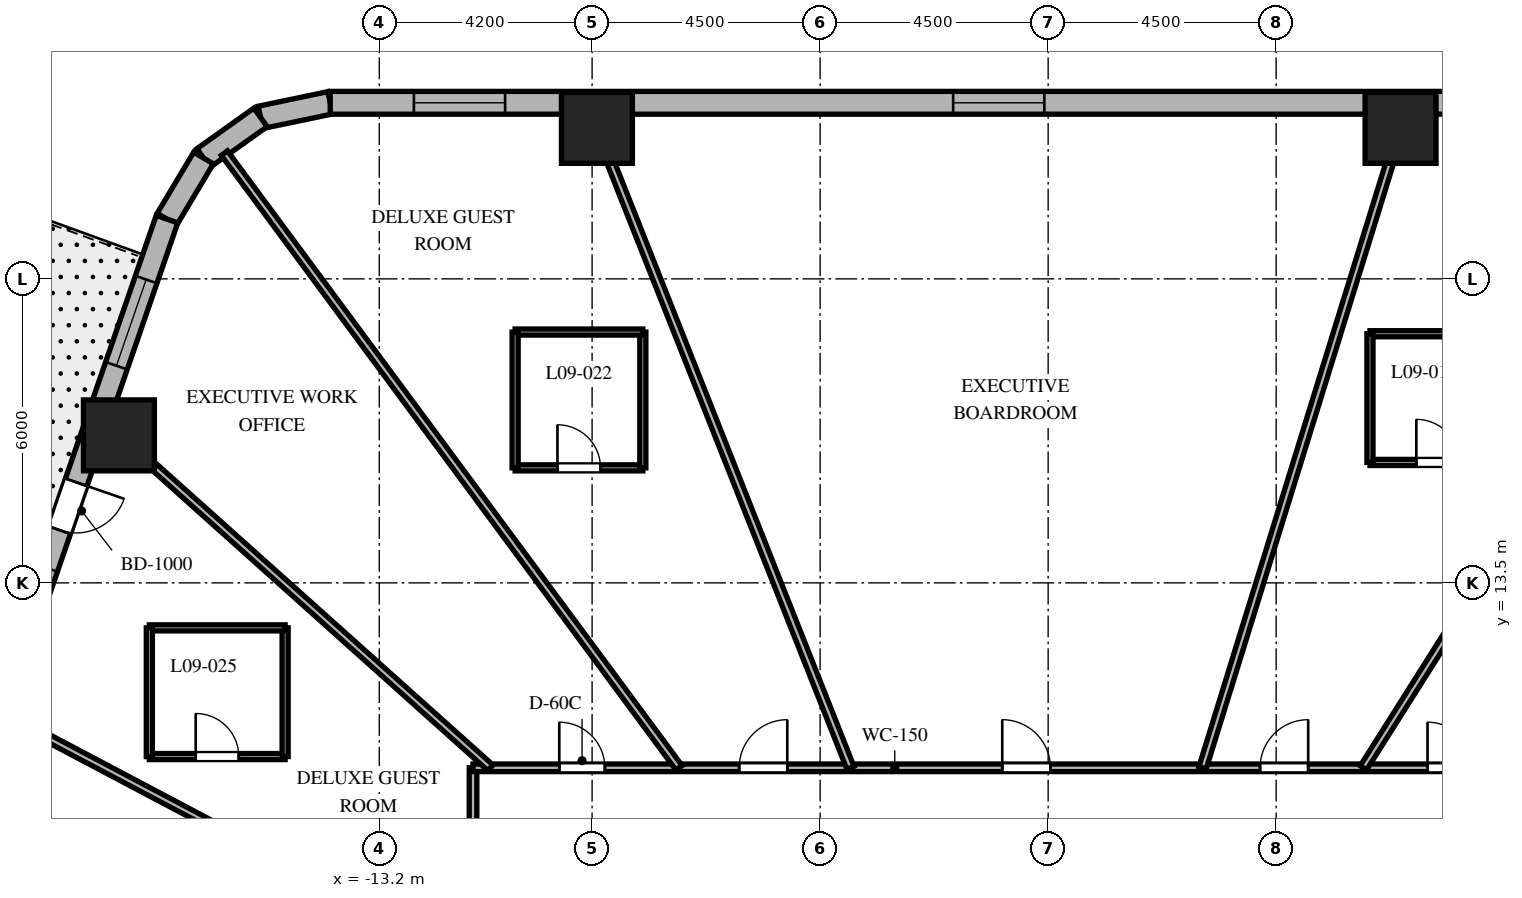
"""IFC4 building model, lengths in metres.
Left out: names, types, materials, properties, quantities, classifications, styles, units other than length and angle.
Written with IfcOpenShell. Run it as: python <this file> out.ifc"""

import sys

from ifc_helpers import new_model, si_unit, direction, frame, frame_2d, origin, origin_2d, place, context, subcontext, project, spatial, rectangle, extrude, element, fill, save


model = new_model("IFC4")
c1 = context("Model", 3, precision=1e-05, world=origin(), true_north=direction((0.0, 1.0)))
c2 = subcontext(c1, "Body", "Model", "MODEL_VIEW")
j1 = project(units=[si_unit("LENGTHUNIT", "METRE"), si_unit("PLANEANGLEUNIT", "RADIAN")], contexts=[c1])
p1 = place(None, origin())
s1 = spatial("IfcSite", under=j1, at=p1, CompositionType="ELEMENT")
p2 = place(p1, origin())
s2 = spatial("IfcBuilding", under=s1, at=p2, CompositionType="ELEMENT")
p3 = place(p2, frame((0.0, 0.0, 45.3)))
s3 = spatial("IfcBuildingStorey", under=s2, at=p3, CompositionType="ELEMENT", Elevation=45.3)
for number, where, z_axis, x_axis in (
    (1, (6.955, 22.48, 0.0), (0.0, 0.0, 1.0), (1.0, 0.0, 0.0)),
    (2, (-8.905, 22.48, 0.0), (0.0, 0.0, 1.0), (1.0, 0.0, 0.0)),
    (3, (-18.338, 16.411, 0.0), (0.0, 0.0, 1.0), (1.0, 0.0, 0.0)),
):
    element("IfcColumn", number, at=place(p3, frame(where, z_axis=z_axis, x_axis=x_axis)), inside=s3, PredefinedType="COLUMN", context=c2, shape_type="SweptSolid", body=[
        extrude(rectangle(XDim=1.4, YDim=1.4, at=origin_2d()), origin(), (0.0, 0.0, 1.0), 3.7),
    ])
p4 = place(p3, frame((-14.168, 22.975, 0.0), z_axis=(0.0, 0.0, 1.0), x_axis=(-0.978770371074, -0.204959900243, 0.0)))
e4 = element("IfcWall", 4, at=p4, inside=s3, PredefinedType="SOLIDWALL", context=c2, shape_type="SweptSolid", body=[
    extrude(rectangle(XDim=1.406, YDim=0.45, at=frame_2d((0.703, 0.0))), origin(), (0.0, 0.0, 1.0), 3.4),
])
p5 = place(p3, frame((-15.544, 22.687, 0.0), z_axis=(0.0, 0.0, 1.0), x_axis=(-0.814210854316, -0.580569276412, 0.0)))
e5 = element("IfcWall", 5, at=p5, inside=s3, PredefinedType="SOLIDWALL", context=c2, shape_type="SweptSolid", body=[
    extrude(rectangle(XDim=1.381, YDim=0.45, at=frame_2d((0.691, 0.0))), origin(), (0.0, 0.0, 1.0), 3.4),
])
p6 = place(p3, frame((-16.669, 21.885, 0.0), z_axis=(0.0, 0.0, 1.0), x_axis=(-0.512936712947, -0.858426425799, 0.0)))
e6 = element("IfcWall", 6, at=p6, inside=s3, PredefinedType="SOLIDWALL", context=c2, shape_type="SweptSolid", body=[
    extrude(rectangle(XDim=1.406, YDim=0.45, at=frame_2d((0.703, 0.0))), origin(), (0.0, 0.0, 1.0), 3.4),
])
p7 = place(p3, frame((12.221, 22.975, 0.0), z_axis=(0.0, 0.0, 1.0), x_axis=(-1.0, 0.0, 0.0)))
e7 = element("IfcWall", 7, at=p7, inside=s3, PredefinedType="SOLIDWALL", context=c2, shape_type="SweptSolid", body=[
    extrude(rectangle(XDim=26.389, YDim=0.45, at=frame_2d((13.195, 0.0))), origin(), (0.0, 0.0, 1.0), 3.4),
])
p8 = place(p7, frame((1.653, 0.0, 0.8)))
e8 = element("IfcOpeningElement", 8, at=p8, cuts=e7, PredefinedType="OPENING", context=c2, shape_type="SweptSolid", body=[
    extrude(rectangle(XDim=1.8, YDim=1.8, at=frame_2d((0.9, 0.9))), frame((0.0, 0.235, 0.0), z_axis=(0.0, -1.0, 0.0), x_axis=(1.0, 0.0, 0.0)), (0.0, 0.0, 1.0), 0.47),
])
p9 = place(p7, frame((12.296, 0.0, 0.8)))
e9 = element("IfcOpeningElement", 9, at=p9, cuts=e7, PredefinedType="OPENING", context=c2, shape_type="SweptSolid", body=[
    extrude(rectangle(XDim=1.8, YDim=1.8, at=frame_2d((0.9, 0.9))), frame((0.0, 0.235, 0.0), z_axis=(0.0, -1.0, 0.0), x_axis=(1.0, 0.0, 0.0)), (0.0, 0.0, 1.0), 0.47),
])
p10 = place(p7, frame((22.938, 0.0, 0.8)))
e10 = element("IfcOpeningElement", 10, at=p10, cuts=e7, PredefinedType="OPENING", context=c2, shape_type="SweptSolid", body=[
    extrude(rectangle(XDim=1.8, YDim=1.8, at=frame_2d((0.9, 0.9))), frame((0.0, 0.235, 0.0), z_axis=(0.0, -1.0, 0.0), x_axis=(1.0, 0.0, 0.0)), (0.0, 0.0, 1.0), 0.47),
])
p11 = place(p3, frame((-17.39, 20.678, 0.0), z_axis=(0.0, 0.0, 1.0), x_axis=(-0.326068018294, -0.945346310854, 0.0)))
e11 = element("IfcWall", 11, at=p11, inside=s3, PredefinedType="SOLIDWALL", context=c2, shape_type="SweptSolid", body=[
    extrude(rectangle(XDim=21.793, YDim=0.45, at=frame_2d((10.896, 0.0))), origin(), (0.0, 0.0, 1.0), 3.4),
])
p12 = place(p11, frame((5.493, 0.0, 0.0)))
e12 = element("IfcOpeningElement", 12, at=p12, cuts=e11, PredefinedType="OPENING", context=c2, shape_type="SweptSolid", body=[
    extrude(rectangle(XDim=1.0, YDim=2.15, at=frame_2d((0.5, 1.075))), frame((0.0, 0.235, 0.0), z_axis=(0.0, -1.0, 0.0), x_axis=(1.0, 0.0, 0.0)), (0.0, 0.0, 1.0), 0.47),
])
p13 = place(p11, frame((1.26, 0.0, 0.8)))
e13 = element("IfcOpeningElement", 13, at=p13, cuts=e11, PredefinedType="OPENING", context=c2, shape_type="SweptSolid", body=[
    extrude(rectangle(XDim=1.8, YDim=1.8, at=frame_2d((0.9, 0.9))), frame((0.0, 0.235, 0.0), z_axis=(0.0, -1.0, 0.0), x_axis=(1.0, 0.0, 0.0)), (0.0, 0.0, 1.0), 0.47),
])
p14 = place(p11, frame((7.283, 0.0, 0.8)))
e14 = element("IfcOpeningElement", 14, at=p14, cuts=e11, PredefinedType="OPENING", context=c2, shape_type="SweptSolid", body=[
    extrude(rectangle(XDim=1.8, YDim=1.8, at=frame_2d((0.9, 0.9))), frame((0.0, 0.235, 0.0), z_axis=(0.0, -1.0, 0.0), x_axis=(1.0, 0.0, 0.0)), (0.0, 0.0, 1.0), 0.47),
])
p15 = place(p11, frame((12.736, 0.0, 0.8)))
e15 = element("IfcOpeningElement", 15, at=p15, cuts=e11, PredefinedType="OPENING", context=c2, shape_type="SweptSolid", body=[
    extrude(rectangle(XDim=1.8, YDim=1.8, at=frame_2d((0.9, 0.9))), frame((0.0, 0.235, 0.0), z_axis=(0.0, -1.0, 0.0), x_axis=(1.0, 0.0, 0.0)), (0.0, 0.0, 1.0), 0.47),
])
p16 = place(p11, frame((18.68, 0.0, 0.8)))
e16 = element("IfcOpeningElement", 16, at=p16, cuts=e11, PredefinedType="OPENING", context=c2, shape_type="SweptSolid", body=[
    extrude(rectangle(XDim=1.8, YDim=1.8, at=frame_2d((0.9, 0.9))), frame((0.0, 0.235, 0.0), z_axis=(0.0, -1.0, 0.0), x_axis=(1.0, 0.0, 0.0)), (0.0, 0.0, 1.0), 0.47),
])
p17 = place(p3, frame((-11.35, -9.85, 0.0), z_axis=(0.0, 0.0, 1.0), x_axis=(0.0, 1.0, 0.0)))
e17 = element("IfcWall", 17, at=p17, inside=s3, PredefinedType="PARTITIONING", context=c2, shape_type="SweptSolid", body=[
    extrude(rectangle(XDim=19.7, YDim=0.15, at=frame_2d((9.85, 0.0))), origin(), (0.0, 0.0, 1.0), 2.84),
])
p18 = place(p17, frame((17.181, 0.0, 0.0)))
e18 = element("IfcOpeningElement", 18, at=p18, cuts=e17, PredefinedType="OPENING", context=c2, shape_type="SweptSolid", body=[
    extrude(rectangle(XDim=0.95, YDim=2.03, at=frame_2d((0.475, 1.015))), frame((0.0, 0.085, 0.0), z_axis=(0.0, -1.0, 0.0), x_axis=(1.0, 0.0, 0.0)), (0.0, 0.0, 1.0), 0.17),
])
p19 = place(p17, frame((13.403, 0.0, 0.0)))
e19 = element("IfcOpeningElement", 19, at=p19, cuts=e17, PredefinedType="OPENING", context=c2, shape_type="SweptSolid", body=[
    extrude(rectangle(XDim=0.95, YDim=2.03, at=frame_2d((0.475, 1.015))), frame((0.0, 0.085, 0.0), z_axis=(0.0, -1.0, 0.0), x_axis=(1.0, 0.0, 0.0)), (0.0, 0.0, 1.0), 0.17),
])
p20 = place(p17, frame((10.134, 0.0, 0.0)))
e20 = element("IfcOpeningElement", 20, at=p20, cuts=e17, PredefinedType="OPENING", context=c2, shape_type="SweptSolid", body=[
    extrude(rectangle(XDim=0.95, YDim=2.03, at=frame_2d((0.475, 1.015))), frame((0.0, 0.085, 0.0), z_axis=(0.0, -1.0, 0.0), x_axis=(1.0, 0.0, 0.0)), (0.0, 0.0, 1.0), 0.17),
])
p21 = place(p17, frame((7.571, 0.0, 0.0)))
e21 = element("IfcOpeningElement", 21, at=p21, cuts=e17, PredefinedType="OPENING", context=c2, shape_type="SweptSolid", body=[
    extrude(rectangle(XDim=0.95, YDim=2.03, at=frame_2d((0.475, 1.015))), frame((0.0, 0.085, 0.0), z_axis=(0.0, -1.0, 0.0), x_axis=(1.0, 0.0, 0.0)), (0.0, 0.0, 1.0), 0.17),
])
p22 = place(p17, frame((3.024, 0.0, 0.0)))
e22 = element("IfcOpeningElement", 22, at=p22, cuts=e17, PredefinedType="OPENING", context=c2, shape_type="SweptSolid", body=[
    extrude(rectangle(XDim=0.95, YDim=2.03, at=frame_2d((0.475, 1.015))), frame((0.0, 0.085, 0.0), z_axis=(0.0, -1.0, 0.0), x_axis=(1.0, 0.0, 0.0)), (0.0, 0.0, 1.0), 0.17),
])
p23 = place(p3, frame((-11.35, 9.85, 0.0), z_axis=(0.0, 0.0, 1.0), x_axis=(1.0, 0.0, 0.0)))
e23 = element("IfcWall", 23, at=p23, inside=s3, PredefinedType="PARTITIONING", context=c2, shape_type="SweptSolid", body=[
    extrude(rectangle(XDim=22.7, YDim=0.15, at=frame_2d((11.35, 0.0))), origin(), (0.0, 0.0, 1.0), 2.84),
])
p24 = place(p23, frame((18.837, 0.0, 0.0)))
e24 = element("IfcOpeningElement", 24, at=p24, cuts=e23, PredefinedType="OPENING", context=c2, shape_type="SweptSolid", body=[
    extrude(rectangle(XDim=0.9, YDim=2.03, at=frame_2d((0.45, 1.015))), frame((0.0, 0.085, 0.0), z_axis=(0.0, -1.0, 0.0), x_axis=(1.0, 0.0, 0.0)), (0.0, 0.0, 1.0), 0.17),
])
p25 = place(p23, frame((15.532, 0.0, 0.0)))
e25 = element("IfcOpeningElement", 25, at=p25, cuts=e23, PredefinedType="OPENING", context=c2, shape_type="SweptSolid", body=[
    extrude(rectangle(XDim=0.95, YDim=2.03, at=frame_2d((0.475, 1.015))), frame((0.0, 0.085, 0.0), z_axis=(0.0, -1.0, 0.0), x_axis=(1.0, 0.0, 0.0)), (0.0, 0.0, 1.0), 0.17),
])
p26 = place(p23, frame((10.444, 0.0, 0.0)))
e26 = element("IfcOpeningElement", 26, at=p26, cuts=e23, PredefinedType="OPENING", context=c2, shape_type="SweptSolid", body=[
    extrude(rectangle(XDim=0.95, YDim=2.03, at=frame_2d((0.475, 1.015))), frame((0.0, 0.085, 0.0), z_axis=(0.0, -1.0, 0.0), x_axis=(1.0, 0.0, 0.0)), (0.0, 0.0, 1.0), 0.17),
])
p27 = place(p23, frame((5.252, 0.0, 0.0)))
e27 = element("IfcOpeningElement", 27, at=p27, cuts=e23, PredefinedType="OPENING", context=c2, shape_type="SweptSolid", body=[
    extrude(rectangle(XDim=0.95, YDim=2.03, at=frame_2d((0.475, 1.015))), frame((0.0, 0.085, 0.0), z_axis=(0.0, -1.0, 0.0), x_axis=(1.0, 0.0, 0.0)), (0.0, 0.0, 1.0), 0.17),
])
p28 = place(p23, frame((1.702, 0.0, 0.0)))
e28 = element("IfcOpeningElement", 28, at=p28, cuts=e23, PredefinedType="OPENING", context=c2, shape_type="SweptSolid", body=[
    extrude(rectangle(XDim=0.9, YDim=2.03, at=frame_2d((0.45, 1.015))), frame((0.0, 0.085, 0.0), z_axis=(0.0, -1.0, 0.0), x_axis=(1.0, 0.0, 0.0)), (0.0, 0.0, 1.0), 0.17),
])
p29 = place(p3, frame((6.222, 9.85, 0.0), z_axis=(0.0, 0.0, 1.0), x_axis=(0.534069056435, 0.845440857162, 0.0)))
e29 = element("IfcWall", 29, at=p29, inside=s3, PredefinedType="PARTITIONING", context=c2, shape_type="SweptSolid", body=[
    extrude(rectangle(XDim=14.611, YDim=0.15, at=frame_2d((7.306, 0.0))), origin(), (0.0, 0.0, 1.0), 2.54),
])
p30 = place(p3, frame((3.048, 9.85, 0.0), z_axis=(0.0, 0.0, 1.0), x_axis=(0.295553992761, 0.955326037206, 0.0)))
e30 = element("IfcWall", 30, at=p30, inside=s3, PredefinedType="PARTITIONING", context=c2, shape_type="SweptSolid", body=[
    extrude(rectangle(XDim=13.739, YDim=0.15, at=frame_2d((6.869, 0.0))), origin(), (0.0, 0.0, 1.0), 2.54),
])
p31 = place(p3, frame((-3.902, 9.85, 0.0), z_axis=(0.0, 0.0, 1.0), x_axis=(-0.36828765711, 0.929711891728, 0.0)))
e31 = element("IfcWall", 31, at=p31, inside=s3, PredefinedType="PARTITIONING", context=c2, shape_type="SweptSolid", body=[
    extrude(rectangle(XDim=14.117, YDim=0.15, at=frame_2d((7.059, 0.0))), origin(), (0.0, 0.0, 1.0), 2.54),
])
p32 = place(p3, frame((-7.285, 9.85, 0.0), z_axis=(0.0, 0.0, 1.0), x_axis=(-0.594630332275, 0.803999233792, 0.0)))
e32 = element("IfcWall", 32, at=p32, inside=s3, PredefinedType="PARTITIONING", context=c2, shape_type="SweptSolid", body=[
    extrude(rectangle(XDim=15.089, YDim=0.15, at=frame_2d((7.544, 0.0))), origin(), (0.0, 0.0, 1.0), 2.54),
])
p33 = place(p3, frame((-11.007, 9.85, 0.0), z_axis=(0.0, 0.0, 1.0), x_axis=(-0.745177305978, 0.666866390407, 0.0)))
e33 = element("IfcWall", 33, at=p33, inside=s3, PredefinedType="PARTITIONING", context=c2, shape_type="SweptSolid", body=[
    extrude(rectangle(XDim=10.375, YDim=0.15, at=frame_2d((5.188, 0.0))), origin(), (0.0, 0.0, 1.0), 2.54),
])
p34 = place(p3, frame((-11.35, 6.001, 0.0), z_axis=(0.0, 0.0, 1.0), x_axis=(-0.884022077319, 0.467445148453, 0.0)))
e34 = element("IfcWall", 34, at=p34, inside=s3, PredefinedType="PARTITIONING", context=c2, shape_type="SweptSolid", body=[
    extrude(rectangle(XDim=10.621, YDim=0.15, at=frame_2d((5.311, 0.0))), origin(), (0.0, 0.0, 1.0), 2.54),
])
p35 = place(p3, frame((6.351, 15.877, 0.0), z_axis=(0.0, 0.0, 1.0), x_axis=(1.0, 0.0, 0.0)))
e35 = element("IfcWall", 35, at=p35, inside=s3, PredefinedType="PARTITIONING", context=c2, shape_type="SweptSolid", body=[
    extrude(rectangle(XDim=2.68, YDim=0.12, at=frame_2d((1.34, 0.0))), origin(), (0.0, 0.0, 1.0), 2.84),
])
p36 = place(p35, frame((0.915, 0.0, 0.0)))
e36 = element("IfcOpeningElement", 36, at=p36, cuts=e35, PredefinedType="OPENING", context=c2, shape_type="SweptSolid", body=[
    extrude(rectangle(XDim=0.85, YDim=2.03, at=frame_2d((0.425, 1.015))), frame((0.0, 0.07, 0.0), z_axis=(0.0, -1.0, 0.0), x_axis=(1.0, 0.0, 0.0)), (0.0, 0.0, 1.0), 0.14),
])
p37 = place(p3, frame((9.031, 18.417, 0.0), z_axis=(0.0, 0.0, 1.0), x_axis=(-1.0, 0.0, 0.0)))
e37 = element("IfcWall", 37, at=p37, inside=s3, PredefinedType="PARTITIONING", context=c2, shape_type="SweptSolid", body=[
    extrude(rectangle(XDim=2.68, YDim=0.12, at=frame_2d((1.34, 0.0))), origin(), (0.0, 0.0, 1.0), 2.84),
])
p38 = place(p3, frame((6.351, 18.417, 0.0), z_axis=(0.0, 0.0, 1.0), x_axis=(0.0, -1.0, 0.0)))
e38 = element("IfcWall", 38, at=p38, inside=s3, PredefinedType="PARTITIONING", context=c2, shape_type="SweptSolid", body=[
    extrude(rectangle(XDim=2.54, YDim=0.12, at=frame_2d((1.27, 0.0))), origin(), (0.0, 0.0, 1.0), 2.84),
])
p39 = place(p3, frame((-10.519, 15.77, 0.0), z_axis=(0.0, 0.0, 1.0), x_axis=(1.0, 0.0, 0.0)))
e39 = element("IfcWall", 39, at=p39, inside=s3, PredefinedType="PARTITIONING", context=c2, shape_type="SweptSolid", body=[
    extrude(rectangle(XDim=2.52, YDim=0.12, at=frame_2d((1.26, 0.0))), origin(), (0.0, 0.0, 1.0), 2.84),
])
p40 = place(p39, frame((0.835, 0.0, 0.0)))
e40 = element("IfcOpeningElement", 40, at=p40, cuts=e39, PredefinedType="OPENING", context=c2, shape_type="SweptSolid", body=[
    extrude(rectangle(XDim=0.85, YDim=2.03, at=frame_2d((0.425, 1.015))), frame((0.0, 0.07, 0.0), z_axis=(0.0, -1.0, 0.0), x_axis=(1.0, 0.0, 0.0)), (0.0, 0.0, 1.0), 0.14),
])
p41 = place(p3, frame((-7.999, 15.77, 0.0), z_axis=(0.0, 0.0, 1.0), x_axis=(0.0, 1.0, 0.0)))
e41 = element("IfcWall", 41, at=p41, inside=s3, PredefinedType="PARTITIONING", context=c2, shape_type="SweptSolid", body=[
    extrude(rectangle(XDim=2.68, YDim=0.12, at=frame_2d((1.34, 0.0))), origin(), (0.0, 0.0, 1.0), 2.84),
])
p42 = place(p3, frame((-7.999, 18.45, 0.0), z_axis=(0.0, 0.0, 1.0), x_axis=(-1.0, 0.0, 0.0)))
e42 = element("IfcWall", 42, at=p42, inside=s3, PredefinedType="PARTITIONING", context=c2, shape_type="SweptSolid", body=[
    extrude(rectangle(XDim=2.52, YDim=0.12, at=frame_2d((1.26, 0.0))), origin(), (0.0, 0.0, 1.0), 2.84),
])
p43 = place(p3, frame((-10.519, 18.45, 0.0), z_axis=(0.0, 0.0, 1.0), x_axis=(0.0, -1.0, 0.0)))
e43 = element("IfcWall", 43, at=p43, inside=s3, PredefinedType="PARTITIONING", context=c2, shape_type="SweptSolid", body=[
    extrude(rectangle(XDim=2.68, YDim=0.12, at=frame_2d((1.34, 0.0))), origin(), (0.0, 0.0, 1.0), 2.927),
])
p44 = place(p3, frame((-17.738, 10.072, 0.0), z_axis=(0.0, 0.0, 1.0), x_axis=(1.0, 0.0, 0.0)))
e44 = element("IfcWall", 44, at=p44, inside=s3, PredefinedType="PARTITIONING", context=c2, shape_type="SweptSolid", body=[
    extrude(rectangle(XDim=2.68, YDim=0.12, at=frame_2d((1.34, 0.0))), origin(), (0.0, 0.0, 1.0), 2.972),
])
p45 = place(p44, frame((0.915, 0.0, 0.0)))
e45 = element("IfcOpeningElement", 45, at=p45, cuts=e44, PredefinedType="OPENING", context=c2, shape_type="SweptSolid", body=[
    extrude(rectangle(XDim=0.85, YDim=2.03, at=frame_2d((0.425, 1.015))), frame((0.0, 0.07, 0.0), z_axis=(0.0, -1.0, 0.0), x_axis=(1.0, 0.0, 0.0)), (0.0, 0.0, 1.0), 0.14),
])
p46 = place(p3, frame((-15.058, 10.072, 0.0), z_axis=(0.0, 0.0, 1.0), x_axis=(0.0, 1.0, 0.0)))
e46 = element("IfcWall", 46, at=p46, inside=s3, PredefinedType="PARTITIONING", context=c2, shape_type="SweptSolid", body=[
    extrude(rectangle(XDim=2.54, YDim=0.12, at=frame_2d((1.27, 0.0))), origin(), (0.0, 0.0, 1.0), 3.4),
])
p47 = place(p3, frame((-15.058, 12.612, 0.0), z_axis=(0.0, 0.0, 1.0), x_axis=(-1.0, 0.0, 0.0)))
e47 = element("IfcWall", 47, at=p47, inside=s3, PredefinedType="PARTITIONING", context=c2, shape_type="SweptSolid", body=[
    extrude(rectangle(XDim=2.68, YDim=0.12, at=frame_2d((1.34, 0.0))), origin(), (0.0, 0.0, 1.0), 2.972),
])
p48 = place(p3, frame((-17.738, 12.612, 0.0), z_axis=(0.0, 0.0, 1.0), x_axis=(0.0, -1.0, 0.0)))
e48 = element("IfcWall", 48, at=p48, inside=s3, PredefinedType="PARTITIONING", context=c2, shape_type="SweptSolid", body=[
    extrude(rectangle(XDim=2.54, YDim=0.12, at=frame_2d((1.27, 0.0))), origin(), (0.0, 0.0, 1.0), 3.4),
])
p49 = place(p9, origin())
e49 = element("IfcWindow", 49, at=p49, inside=s3, PartitioningType="SINGLE_PANEL", PredefinedType="WINDOW", context=c2, shape_type="SweptSolid", body=[
    extrude(rectangle(XDim=1.8, YDim=1.8, at=frame_2d((0.9, 0.9))), frame((0.0, 0.03, 0.0), z_axis=(0.0, -1.0, 0.0), x_axis=(1.0, 0.0, 0.0)), (0.0, 0.0, 1.0), 0.06),
])
fill(e9, e49)
p50 = place(p10, origin())
e50 = element("IfcWindow", 50, at=p50, inside=s3, PartitioningType="SINGLE_PANEL", PredefinedType="WINDOW", context=c2, shape_type="SweptSolid", body=[
    extrude(rectangle(XDim=1.8, YDim=1.8, at=frame_2d((0.9, 0.9))), frame((0.0, 0.03, 0.0), z_axis=(0.0, -1.0, 0.0), x_axis=(1.0, 0.0, 0.0)), (0.0, 0.0, 1.0), 0.06),
])
fill(e10, e50)
p51 = place(p12, origin())
e51 = element("IfcDoor", 51, at=p51, inside=s3, OperationType="SINGLE_SWING_LEFT", PredefinedType="DOOR", context=c2, shape_type="SweptSolid", body=[
    extrude(rectangle(XDim=1.0, YDim=2.15, at=frame_2d((0.5, 1.075))), frame((0.0, 0.025, 0.0), z_axis=(0.0, -1.0, 0.0), x_axis=(1.0, 0.0, 0.0)), (0.0, 0.0, 1.0), 0.05),
])
fill(e12, e51)
p52 = place(p13, origin())
e52 = element("IfcWindow", 52, at=p52, inside=s3, PartitioningType="SINGLE_PANEL", PredefinedType="WINDOW", context=c2, shape_type="SweptSolid", body=[
    extrude(rectangle(XDim=1.8, YDim=1.8, at=frame_2d((0.9, 0.9))), frame((0.0, 0.03, 0.0), z_axis=(0.0, -1.0, 0.0), x_axis=(1.0, 0.0, 0.0)), (0.0, 0.0, 1.0), 0.06),
])
fill(e13, e52)
p53 = place(p24, origin())
e53 = element("IfcDoor", 53, at=p53, inside=s3, OperationType="SINGLE_SWING_LEFT", PredefinedType="DOOR", context=c2, shape_type="SweptSolid", body=[
    extrude(rectangle(XDim=0.9, YDim=2.03, at=frame_2d((0.45, 1.015))), frame((0.0, 0.025, 0.0), z_axis=(0.0, -1.0, 0.0), x_axis=(1.0, 0.0, 0.0)), (0.0, 0.0, 1.0), 0.05),
])
fill(e24, e53)
p54 = place(p25, origin())
e54 = element("IfcDoor", 54, at=p54, inside=s3, OperationType="SINGLE_SWING_RIGHT", PredefinedType="DOOR", context=c2, shape_type="SweptSolid", body=[
    extrude(rectangle(XDim=0.95, YDim=2.03, at=frame_2d((0.475, 1.015))), frame((0.0, 0.025, 0.0), z_axis=(0.0, -1.0, 0.0), x_axis=(1.0, 0.0, 0.0)), (0.0, 0.0, 1.0), 0.05),
])
fill(e25, e54)
p55 = place(p36, origin())
e55 = element("IfcDoor", 55, at=p55, inside=s3, OperationType="SINGLE_SWING_LEFT", PredefinedType="DOOR", context=c2, shape_type="SweptSolid", body=[
    extrude(rectangle(XDim=0.85, YDim=2.03, at=frame_2d((0.425, 1.015))), frame((0.0, 0.025, 0.0), z_axis=(0.0, -1.0, 0.0), x_axis=(1.0, 0.0, 0.0)), (0.0, 0.0, 1.0), 0.05),
])
fill(e36, e55)
p56 = place(p26, origin())
e56 = element("IfcDoor", 56, at=p56, inside=s3, OperationType="SINGLE_SWING_LEFT", PredefinedType="DOOR", context=c2, shape_type="SweptSolid", body=[
    extrude(rectangle(XDim=0.95, YDim=2.03, at=frame_2d((0.475, 1.015))), frame((0.0, 0.025, 0.0), z_axis=(0.0, -1.0, 0.0), x_axis=(1.0, 0.0, 0.0)), (0.0, 0.0, 1.0), 0.05),
])
fill(e26, e56)
p57 = place(p27, origin())
e57 = element("IfcDoor", 57, at=p57, inside=s3, OperationType="SINGLE_SWING_RIGHT", PredefinedType="DOOR", context=c2, shape_type="SweptSolid", body=[
    extrude(rectangle(XDim=0.95, YDim=2.03, at=frame_2d((0.475, 1.015))), frame((0.0, 0.025, 0.0), z_axis=(0.0, -1.0, 0.0), x_axis=(1.0, 0.0, 0.0)), (0.0, 0.0, 1.0), 0.05),
])
fill(e27, e57)
p58 = place(p40, origin())
e58 = element("IfcDoor", 58, at=p58, inside=s3, OperationType="SINGLE_SWING_LEFT", PredefinedType="DOOR", context=c2, shape_type="SweptSolid", body=[
    extrude(rectangle(XDim=0.85, YDim=2.03, at=frame_2d((0.425, 1.015))), frame((0.0, 0.025, 0.0), z_axis=(0.0, -1.0, 0.0), x_axis=(1.0, 0.0, 0.0)), (0.0, 0.0, 1.0), 0.05),
])
fill(e40, e58)
p59 = place(p28, origin())
e59 = element("IfcDoor", 59, at=p59, inside=s3, OperationType="SINGLE_SWING_LEFT", PredefinedType="DOOR", context=c2, shape_type="SweptSolid", body=[
    extrude(rectangle(XDim=0.9, YDim=2.03, at=frame_2d((0.45, 1.015))), frame((0.0, 0.025, 0.0), z_axis=(0.0, -1.0, 0.0), x_axis=(1.0, 0.0, 0.0)), (0.0, 0.0, 1.0), 0.05),
])
fill(e28, e59)
p60 = place(p45, origin())
e60 = element("IfcDoor", 60, at=p60, inside=s3, OperationType="SINGLE_SWING_LEFT", PredefinedType="DOOR", context=c2, shape_type="SweptSolid", body=[
    extrude(rectangle(XDim=0.85, YDim=2.03, at=frame_2d((0.425, 1.015))), frame((0.0, 0.025, 0.0), z_axis=(0.0, -1.0, 0.0), x_axis=(1.0, 0.0, 0.0)), (0.0, 0.0, 1.0), 0.05),
])
fill(e45, e60)
save(model, sys.argv[1])
